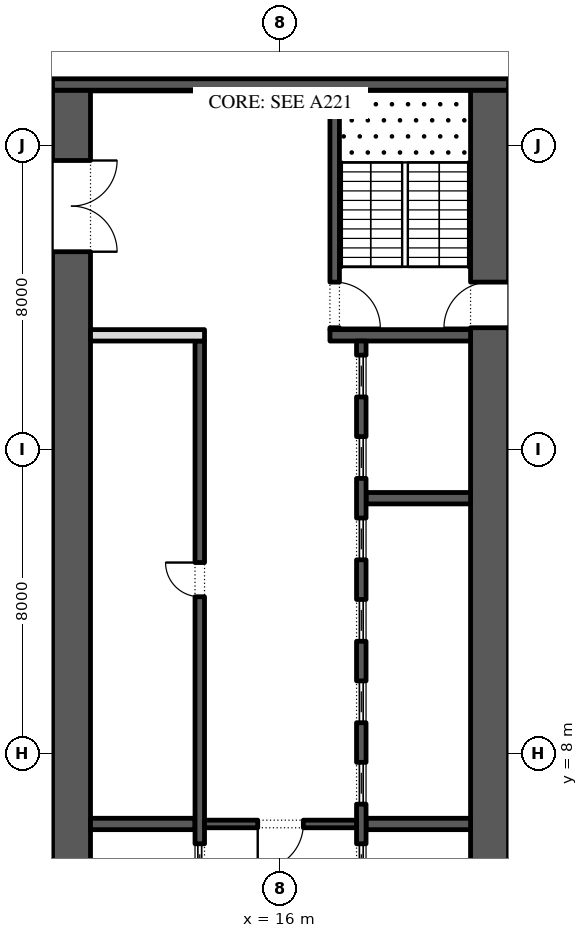
"""IFC4 building model, lengths in metres.
Left out: names, types, materials, properties, quantities, classifications, styles, units other than length and angle.
Written with IfcOpenShell. Run it as: python <this file> out.ifc"""

import sys

from ifc_helpers import new_model, si_unit, direction, frame, frame_2d, origin, place, context, subcontext, project, spatial, rectangle, extrude, element, fill, save


model = new_model("IFC4")
c1 = context("Model", 3, precision=1e-05, world=origin(), true_north=direction((0.0, 1.0)))
c2 = subcontext(c1, "Body", "Model", "MODEL_VIEW")
j1 = project(units=[si_unit("LENGTHUNIT", "METRE"), si_unit("PLANEANGLEUNIT", "RADIAN")], contexts=[c1])
p1 = place(None, origin())
s1 = spatial("IfcSite", under=j1, at=p1, CompositionType="ELEMENT")
p2 = place(p1, origin())
s2 = spatial("IfcBuilding", under=s1, at=p2, CompositionType="ELEMENT")
p3 = place(p2, frame((0.0, 0.0, 85.8)))
s3 = spatial("IfcBuildingStorey", under=s2, at=p3, CompositionType="ELEMENT", Elevation=85.8)
p4 = place(p3, frame((21.5, -2.45, 0.0), z_axis=(0.0, 0.0, 1.0), x_axis=(0.0, 1.0, 0.0)))
e1 = element("IfcWall", 1, at=p4, inside=s3, PredefinedType="SHEAR", context=c2, shape_type="SweptSolid", body=[
    extrude(rectangle(XDim=27.9, YDim=1.0, at=frame_2d((13.95, 0.0))), origin(), (0.0, 0.0, 1.0), 3.95),
])
p5 = place(p4, frame((5.05, 0.0, 0.0)))
e2 = element("IfcOpeningElement", 2, at=p5, cuts=e1, PredefinedType="OPENING", context=c2, shape_type="SweptSolid", body=[
    extrude(rectangle(XDim=1.2, YDim=2.1, at=frame_2d((0.6, 1.05))), frame((0.0, 0.51, 0.0), z_axis=(0.0, -1.0, 0.0), x_axis=(1.0, 0.0, 0.0)), (0.0, 0.0, 1.0), 1.02),
])
p6 = place(p4, frame((21.65, 0.0, 0.0)))
e3 = element("IfcOpeningElement", 3, at=p6, cuts=e1, PredefinedType="OPENING", context=c2, shape_type="SweptSolid", body=[
    extrude(rectangle(XDim=1.2, YDim=2.1, at=frame_2d((0.6, 1.05))), frame((0.0, 0.51, 0.0), z_axis=(0.0, -1.0, 0.0), x_axis=(1.0, 0.0, 0.0)), (0.0, 0.0, 1.0), 1.02),
])
p7 = place(p3, frame((10.5, -2.45, 0.0), z_axis=(0.0, 0.0, 1.0), x_axis=(0.0, 1.0, 0.0)))
e4 = element("IfcWall", 4, at=p7, inside=s3, PredefinedType="SHEAR", context=c2, shape_type="SweptSolid", body=[
    extrude(rectangle(XDim=27.9, YDim=1.0, at=frame_2d((13.95, 0.0))), origin(), (0.0, 0.0, 1.0), 3.95),
])
p8 = place(p7, frame((23.65, 0.0, 0.0)))
e5 = element("IfcOpeningElement", 5, at=p8, cuts=e4, PredefinedType="OPENING", context=c2, shape_type="SweptSolid", body=[
    extrude(rectangle(XDim=2.4, YDim=2.1, at=frame_2d((1.2, 1.05))), frame((0.0, 0.51, 0.0), z_axis=(0.0, -1.0, 0.0), x_axis=(1.0, 0.0, 0.0)), (0.0, 0.0, 1.0), 1.02),
])
p9 = place(p7, frame((1.087, 0.0, 0.0)))
e6 = element("IfcOpeningElement", 6, at=p9, cuts=e4, PredefinedType="OPENING", context=c2, shape_type="SweptSolid", body=[
    extrude(rectangle(XDim=0.9, YDim=2.1, at=frame_2d((0.45, 1.05))), frame((0.0, 0.51, 0.0), z_axis=(0.0, -1.0, 0.0), x_axis=(1.0, 0.0, 0.0)), (0.0, 0.0, 1.0), 1.02),
])
p10 = place(p7, frame((4.312, 0.0, 0.0)))
e7 = element("IfcOpeningElement", 7, at=p10, cuts=e4, PredefinedType="OPENING", context=c2, shape_type="SweptSolid", body=[
    extrude(rectangle(XDim=0.9, YDim=2.1, at=frame_2d((0.45, 1.05))), frame((0.0, 0.51, 0.0), z_axis=(0.0, -1.0, 0.0), x_axis=(1.0, 0.0, 0.0)), (0.0, 0.0, 1.0), 1.02),
])
p11 = place(p3, frame((10.0, 25.6, 0.0), z_axis=(0.0, 0.0, 1.0), x_axis=(1.0, 0.0, 0.0)))
e8 = element("IfcWall", 8, at=p11, inside=s3, PredefinedType="SHEAR", context=c2, shape_type="SweptSolid", body=[
    extrude(rectangle(XDim=12.0, YDim=0.3, at=frame_2d((6.0, 0.0))), origin(), (0.0, 0.0, 1.0), 3.95),
])
p12 = place(p3, frame((17.3, 19.0, 0.0), z_axis=(0.0, 0.0, 1.0), x_axis=(1.0, 0.0, 0.0)))
e9 = element("IfcWall", 9, at=p12, inside=s3, PredefinedType="SHEAR", context=c2, shape_type="SweptSolid", body=[
    extrude(rectangle(XDim=3.7, YDim=0.3, at=frame_2d((1.85, 0.0))), origin(), (0.0, 0.0, 1.0), 3.95),
])
p13 = place(p3, frame((17.425, 19.15, 0.0), z_axis=(0.0, 0.0, 1.0), x_axis=(0.0, 1.0, 0.0)))
e10 = element("IfcWall", 10, at=p13, inside=s3, PredefinedType="SHEAR", context=c2, shape_type="SweptSolid", body=[
    extrude(rectangle(XDim=6.3, YDim=0.25, at=frame_2d((3.15, 0.0))), origin(), (0.0, 0.0, 1.0), 3.95),
])
p14 = place(p13, frame((0.05, 0.0, 0.0)))
e11 = element("IfcOpeningElement", 11, at=p14, cuts=e10, PredefinedType="OPENING", context=c2, shape_type="SweptSolid", body=[
    extrude(rectangle(XDim=1.2, YDim=2.1, at=frame_2d((0.6, 1.05))), frame((0.0, 0.135, 0.0), z_axis=(0.0, -1.0, 0.0), x_axis=(1.0, 0.0, 0.0)), (0.0, 0.0, 1.0), 0.27),
])
for number, where, z_axis, x_axis in (
    (12, (18.25, 6.143, 0.0), (0.0, 0.0, 1.0), (1.0, 0.0, 0.0)),
    (13, (18.25, 14.714, 0.0), (0.0, 0.0, 1.0), (1.0, 0.0, 0.0)),
):
    element("IfcWall", number, at=place(p3, frame(where, z_axis=z_axis, x_axis=x_axis)), inside=s3, PredefinedType="SHEAR", context=c2, shape_type="SweptSolid", body=[
        extrude(rectangle(XDim=2.75, YDim=0.3, at=frame_2d((1.375, 0.0))), origin(), (0.0, 0.0, 1.0), 3.95),
    ])
p15 = place(p3, frame((18.125, 4.15, 0.0), z_axis=(0.0, 0.0, 1.0), x_axis=(0.0, 1.0, 0.0)))
e14 = element("IfcWall", 14, at=p15, inside=s3, PredefinedType="SHEAR", context=c2, shape_type="SweptSolid", body=[
    extrude(rectangle(XDim=14.7, YDim=0.25, at=frame_2d((7.35, 0.0))), origin(), (0.0, 0.0, 1.0), 3.95),
])
p16 = place(p15, frame((0.371, 0.0, 0.0)))
e15 = element("IfcOpeningElement", 15, at=p16, cuts=e14, PredefinedType="OPENING", context=c2, shape_type="SweptSolid", body=[
    extrude(rectangle(XDim=1.1, YDim=2.1, at=frame_2d((0.55, 1.05))), frame((0.0, 0.135, 0.0), z_axis=(0.0, -1.0, 0.0), x_axis=(1.0, 0.0, 0.0)), (0.0, 0.0, 1.0), 0.27),
])
p17 = place(p15, frame((2.514, 0.0, 0.0)))
e16 = element("IfcOpeningElement", 16, at=p17, cuts=e14, PredefinedType="OPENING", context=c2, shape_type="SweptSolid", body=[
    extrude(rectangle(XDim=1.1, YDim=2.1, at=frame_2d((0.55, 1.05))), frame((0.0, 0.135, 0.0), z_axis=(0.0, -1.0, 0.0), x_axis=(1.0, 0.0, 0.0)), (0.0, 0.0, 1.0), 0.27),
])
p18 = place(p15, frame((4.657, 0.0, 0.0)))
e17 = element("IfcOpeningElement", 17, at=p18, cuts=e14, PredefinedType="OPENING", context=c2, shape_type="SweptSolid", body=[
    extrude(rectangle(XDim=1.1, YDim=2.1, at=frame_2d((0.55, 1.05))), frame((0.0, 0.135, 0.0), z_axis=(0.0, -1.0, 0.0), x_axis=(1.0, 0.0, 0.0)), (0.0, 0.0, 1.0), 0.27),
])
p19 = place(p15, frame((6.8, 0.0, 0.0)))
e18 = element("IfcOpeningElement", 18, at=p19, cuts=e14, PredefinedType="OPENING", context=c2, shape_type="SweptSolid", body=[
    extrude(rectangle(XDim=1.1, YDim=2.1, at=frame_2d((0.55, 1.05))), frame((0.0, 0.135, 0.0), z_axis=(0.0, -1.0, 0.0), x_axis=(1.0, 0.0, 0.0)), (0.0, 0.0, 1.0), 0.27),
])
p20 = place(p15, frame((8.943, 0.0, 0.0)))
e19 = element("IfcOpeningElement", 19, at=p20, cuts=e14, PredefinedType="OPENING", context=c2, shape_type="SweptSolid", body=[
    extrude(rectangle(XDim=1.1, YDim=2.1, at=frame_2d((0.55, 1.05))), frame((0.0, 0.135, 0.0), z_axis=(0.0, -1.0, 0.0), x_axis=(1.0, 0.0, 0.0)), (0.0, 0.0, 1.0), 0.27),
])
p21 = place(p15, frame((11.086, 0.0, 0.0)))
e20 = element("IfcOpeningElement", 20, at=p21, cuts=e14, PredefinedType="OPENING", context=c2, shape_type="SweptSolid", body=[
    extrude(rectangle(XDim=1.1, YDim=2.1, at=frame_2d((0.55, 1.05))), frame((0.0, 0.135, 0.0), z_axis=(0.0, -1.0, 0.0), x_axis=(1.0, 0.0, 0.0)), (0.0, 0.0, 1.0), 0.27),
])
p22 = place(p15, frame((13.229, 0.0, 0.0)))
e21 = element("IfcOpeningElement", 21, at=p22, cuts=e14, PredefinedType="OPENING", context=c2, shape_type="SweptSolid", body=[
    extrude(rectangle(XDim=1.1, YDim=2.1, at=frame_2d((0.55, 1.05))), frame((0.0, 0.135, 0.0), z_axis=(0.0, -1.0, 0.0), x_axis=(1.0, 0.0, 0.0)), (0.0, 0.0, 1.0), 0.27),
])
p23 = place(p3, frame((11.0, 6.143, 0.0), z_axis=(0.0, 0.0, 1.0), x_axis=(1.0, 0.0, 0.0)))
e22 = element("IfcWall", 22, at=p23, inside=s3, PredefinedType="SHEAR", context=c2, shape_type="SweptSolid", body=[
    extrude(rectangle(XDim=2.75, YDim=0.3, at=frame_2d((1.375, 0.0))), origin(), (0.0, 0.0, 1.0), 3.95),
])
p24 = place(p3, frame((13.875, -2.45, 0.0), z_axis=(0.0, 0.0, 1.0), x_axis=(0.0, 1.0, 0.0)))
e23 = element("IfcWall", 23, at=p24, inside=s3, PredefinedType="SHEAR", context=c2, shape_type="SweptSolid", body=[
    extrude(rectangle(XDim=21.3, YDim=0.25, at=frame_2d((10.65, 0.0))), origin(), (0.0, 0.0, 1.0), 3.95),
])
p25 = place(p24, frame((14.571, 0.0, 0.0)))
e24 = element("IfcOpeningElement", 24, at=p25, cuts=e23, PredefinedType="OPENING", context=c2, shape_type="SweptSolid", body=[
    extrude(rectangle(XDim=0.9, YDim=2.1, at=frame_2d((0.45, 1.05))), frame((0.0, 0.135, 0.0), z_axis=(0.0, -1.0, 0.0), x_axis=(1.0, 0.0, 0.0)), (0.0, 0.0, 1.0), 0.27),
])
p26 = place(p24, frame((6.971, 0.0, 0.0)))
e25 = element("IfcOpeningElement", 25, at=p26, cuts=e23, PredefinedType="OPENING", context=c2, shape_type="SweptSolid", body=[
    extrude(rectangle(XDim=1.1, YDim=2.1, at=frame_2d((0.55, 1.05))), frame((0.0, 0.135, 0.0), z_axis=(0.0, -1.0, 0.0), x_axis=(1.0, 0.0, 0.0)), (0.0, 0.0, 1.0), 0.27),
])
p27 = place(p3, frame((11.0, 19.0, 0.0), z_axis=(0.0, 0.0, 1.0), x_axis=(1.0, 0.0, 0.0)))
e26 = element("IfcWall", 26, at=p27, inside=s3, PredefinedType="PARTITIONING", context=c2, shape_type="SweptSolid", body=[
    extrude(rectangle(XDim=3.0, YDim=0.3, at=frame_2d((1.5, 0.0))), origin(), (0.0, 0.0, 1.0), 3.95),
])
p28 = place(p3, frame((14.0, 6.143, 0.0), z_axis=(0.0, 0.0, 1.0), x_axis=(1.0, 0.0, 0.0)))
e27 = element("IfcWall", 27, at=p28, inside=s3, PredefinedType="SHEAR", context=c2, shape_type="SweptSolid", body=[
    extrude(rectangle(XDim=4.0, YDim=0.2, at=frame_2d((2.0, 0.0))), origin(), (0.0, 0.0, 1.0), 3.95),
])
p29 = place(p28, frame((1.4, 0.0, 0.0)))
e28 = element("IfcOpeningElement", 28, at=p29, cuts=e27, PredefinedType="OPENING", context=c2, shape_type="SweptSolid", body=[
    extrude(rectangle(XDim=1.2, YDim=2.1, at=frame_2d((0.6, 1.05))), frame((0.0, 0.11, 0.0), z_axis=(0.0, -1.0, 0.0), x_axis=(1.0, 0.0, 0.0)), (0.0, 0.0, 1.0), 0.22),
])
p30 = place(p16, origin())
e29 = element("IfcDoor", 29, at=p30, inside=s3, OperationType="SLIDING_TO_LEFT", PredefinedType="DOOR", context=c2, shape_type="SweptSolid", body=[
    extrude(rectangle(XDim=1.1, YDim=2.1, at=frame_2d((0.55, 1.05))), frame((0.0, 0.025, 0.0), z_axis=(0.0, -1.0, 0.0), x_axis=(1.0, 0.0, 0.0)), (0.0, 0.0, 1.0), 0.05),
])
fill(e15, e29)
p31 = place(p17, origin())
e30 = element("IfcDoor", 30, at=p31, inside=s3, OperationType="SLIDING_TO_LEFT", PredefinedType="DOOR", context=c2, shape_type="SweptSolid", body=[
    extrude(rectangle(XDim=1.1, YDim=2.1, at=frame_2d((0.55, 1.05))), frame((0.0, 0.025, 0.0), z_axis=(0.0, -1.0, 0.0), x_axis=(1.0, 0.0, 0.0)), (0.0, 0.0, 1.0), 0.05),
])
fill(e16, e30)
p32 = place(p18, origin())
e31 = element("IfcDoor", 31, at=p32, inside=s3, OperationType="SLIDING_TO_LEFT", PredefinedType="DOOR", context=c2, shape_type="SweptSolid", body=[
    extrude(rectangle(XDim=1.1, YDim=2.1, at=frame_2d((0.55, 1.05))), frame((0.0, 0.025, 0.0), z_axis=(0.0, -1.0, 0.0), x_axis=(1.0, 0.0, 0.0)), (0.0, 0.0, 1.0), 0.05),
])
fill(e17, e31)
p33 = place(p19, origin())
e32 = element("IfcDoor", 32, at=p33, inside=s3, OperationType="SLIDING_TO_LEFT", PredefinedType="DOOR", context=c2, shape_type="SweptSolid", body=[
    extrude(rectangle(XDim=1.1, YDim=2.1, at=frame_2d((0.55, 1.05))), frame((0.0, 0.025, 0.0), z_axis=(0.0, -1.0, 0.0), x_axis=(1.0, 0.0, 0.0)), (0.0, 0.0, 1.0), 0.05),
])
fill(e18, e32)
p34 = place(p20, origin())
e33 = element("IfcDoor", 33, at=p34, inside=s3, OperationType="SLIDING_TO_LEFT", PredefinedType="DOOR", context=c2, shape_type="SweptSolid", body=[
    extrude(rectangle(XDim=1.1, YDim=2.1, at=frame_2d((0.55, 1.05))), frame((0.0, 0.025, 0.0), z_axis=(0.0, -1.0, 0.0), x_axis=(1.0, 0.0, 0.0)), (0.0, 0.0, 1.0), 0.05),
])
fill(e19, e33)
p35 = place(p21, origin())
e34 = element("IfcDoor", 34, at=p35, inside=s3, OperationType="SLIDING_TO_LEFT", PredefinedType="DOOR", context=c2, shape_type="SweptSolid", body=[
    extrude(rectangle(XDim=1.1, YDim=2.1, at=frame_2d((0.55, 1.05))), frame((0.0, 0.025, 0.0), z_axis=(0.0, -1.0, 0.0), x_axis=(1.0, 0.0, 0.0)), (0.0, 0.0, 1.0), 0.05),
])
fill(e20, e34)
p36 = place(p22, origin())
e35 = element("IfcDoor", 35, at=p36, inside=s3, OperationType="SLIDING_TO_LEFT", PredefinedType="DOOR", context=c2, shape_type="SweptSolid", body=[
    extrude(rectangle(XDim=1.1, YDim=2.1, at=frame_2d((0.55, 1.05))), frame((0.0, 0.025, 0.0), z_axis=(0.0, -1.0, 0.0), x_axis=(1.0, 0.0, 0.0)), (0.0, 0.0, 1.0), 0.05),
])
fill(e21, e35)
p37 = place(p25, origin())
e36 = element("IfcDoor", 36, at=p37, inside=s3, OperationType="SINGLE_SWING_LEFT", PredefinedType="DOOR", context=c2, shape_type="SweptSolid", body=[
    extrude(rectangle(XDim=0.9, YDim=2.1, at=frame_2d((0.45, 1.05))), frame((0.0, 0.125, 0.0), z_axis=(0.0, -1.0, 0.0), x_axis=(1.0, 0.0, 0.0)), (0.0, 0.0, 1.0), 0.05),
])
fill(e24, e36)
p38 = place(p26, origin())
e37 = element("IfcDoor", 37, at=p38, inside=s3, OperationType="SLIDING_TO_LEFT", PredefinedType="DOOR", context=c2, shape_type="SweptSolid", body=[
    extrude(rectangle(XDim=1.1, YDim=2.1, at=frame_2d((0.55, 1.05))), frame((0.0, 0.025, 0.0), z_axis=(0.0, -1.0, 0.0), x_axis=(1.0, 0.0, 0.0)), (0.0, 0.0, 1.0), 0.05),
])
fill(e25, e37)
p39 = place(p29, frame((1.2, 0.0, 0.0), z_axis=(0.0, 0.0, 1.0), x_axis=(-1.0, 0.0, 0.0)))
e38 = element("IfcDoor", 38, at=p39, inside=s3, OperationType="SINGLE_SWING_LEFT", PredefinedType="DOOR", context=c2, shape_type="SweptSolid", body=[
    extrude(rectangle(XDim=1.2, YDim=2.1, at=frame_2d((0.6, 1.05))), frame((0.0, 0.025, 0.0), z_axis=(0.0, -1.0, 0.0), x_axis=(1.0, 0.0, 0.0)), (0.0, 0.0, 1.0), 0.05),
])
fill(e28, e38)
p40 = place(p8, frame((2.4, 0.0, 0.0), z_axis=(0.0, 0.0, 1.0), x_axis=(-1.0, 0.0, 0.0)))
e39 = element("IfcDoor", 39, at=p40, inside=s3, OperationType="DOUBLE_DOOR_SINGLE_SWING", PredefinedType="DOOR", context=c2, shape_type="SweptSolid", body=[
    extrude(rectangle(XDim=2.4, YDim=2.1, at=frame_2d((1.2, 1.05))), frame((0.0, 0.025, 0.0), z_axis=(0.0, -1.0, 0.0), x_axis=(1.0, 0.0, 0.0)), (0.0, 0.0, 1.0), 0.05),
])
fill(e5, e39)
p41 = place(p14, frame((1.2, 0.0, 0.0), z_axis=(0.0, 0.0, 1.0), x_axis=(-1.0, 0.0, 0.0)))
e40 = element("IfcDoor", 40, at=p41, inside=s3, OperationType="SINGLE_SWING_LEFT", PredefinedType="DOOR", context=c2, shape_type="SweptSolid", body=[
    extrude(rectangle(XDim=1.2, YDim=2.1, at=frame_2d((0.6, 1.05))), frame((0.0, 0.025, 0.0), z_axis=(0.0, -1.0, 0.0), x_axis=(1.0, 0.0, 0.0)), (0.0, 0.0, 1.0), 0.05),
])
fill(e11, e40)
p42 = place(p6, origin())
e41 = element("IfcDoor", 41, at=p42, inside=s3, OperationType="SINGLE_SWING_RIGHT", PredefinedType="DOOR", context=c2, shape_type="SweptSolid", body=[
    extrude(rectangle(XDim=1.2, YDim=2.1, at=frame_2d((0.6, 1.05))), frame((0.0, 0.025, 0.0), z_axis=(0.0, -1.0, 0.0), x_axis=(1.0, 0.0, 0.0)), (0.0, 0.0, 1.0), 0.05),
])
fill(e3, e41)
save(model, sys.argv[1])
